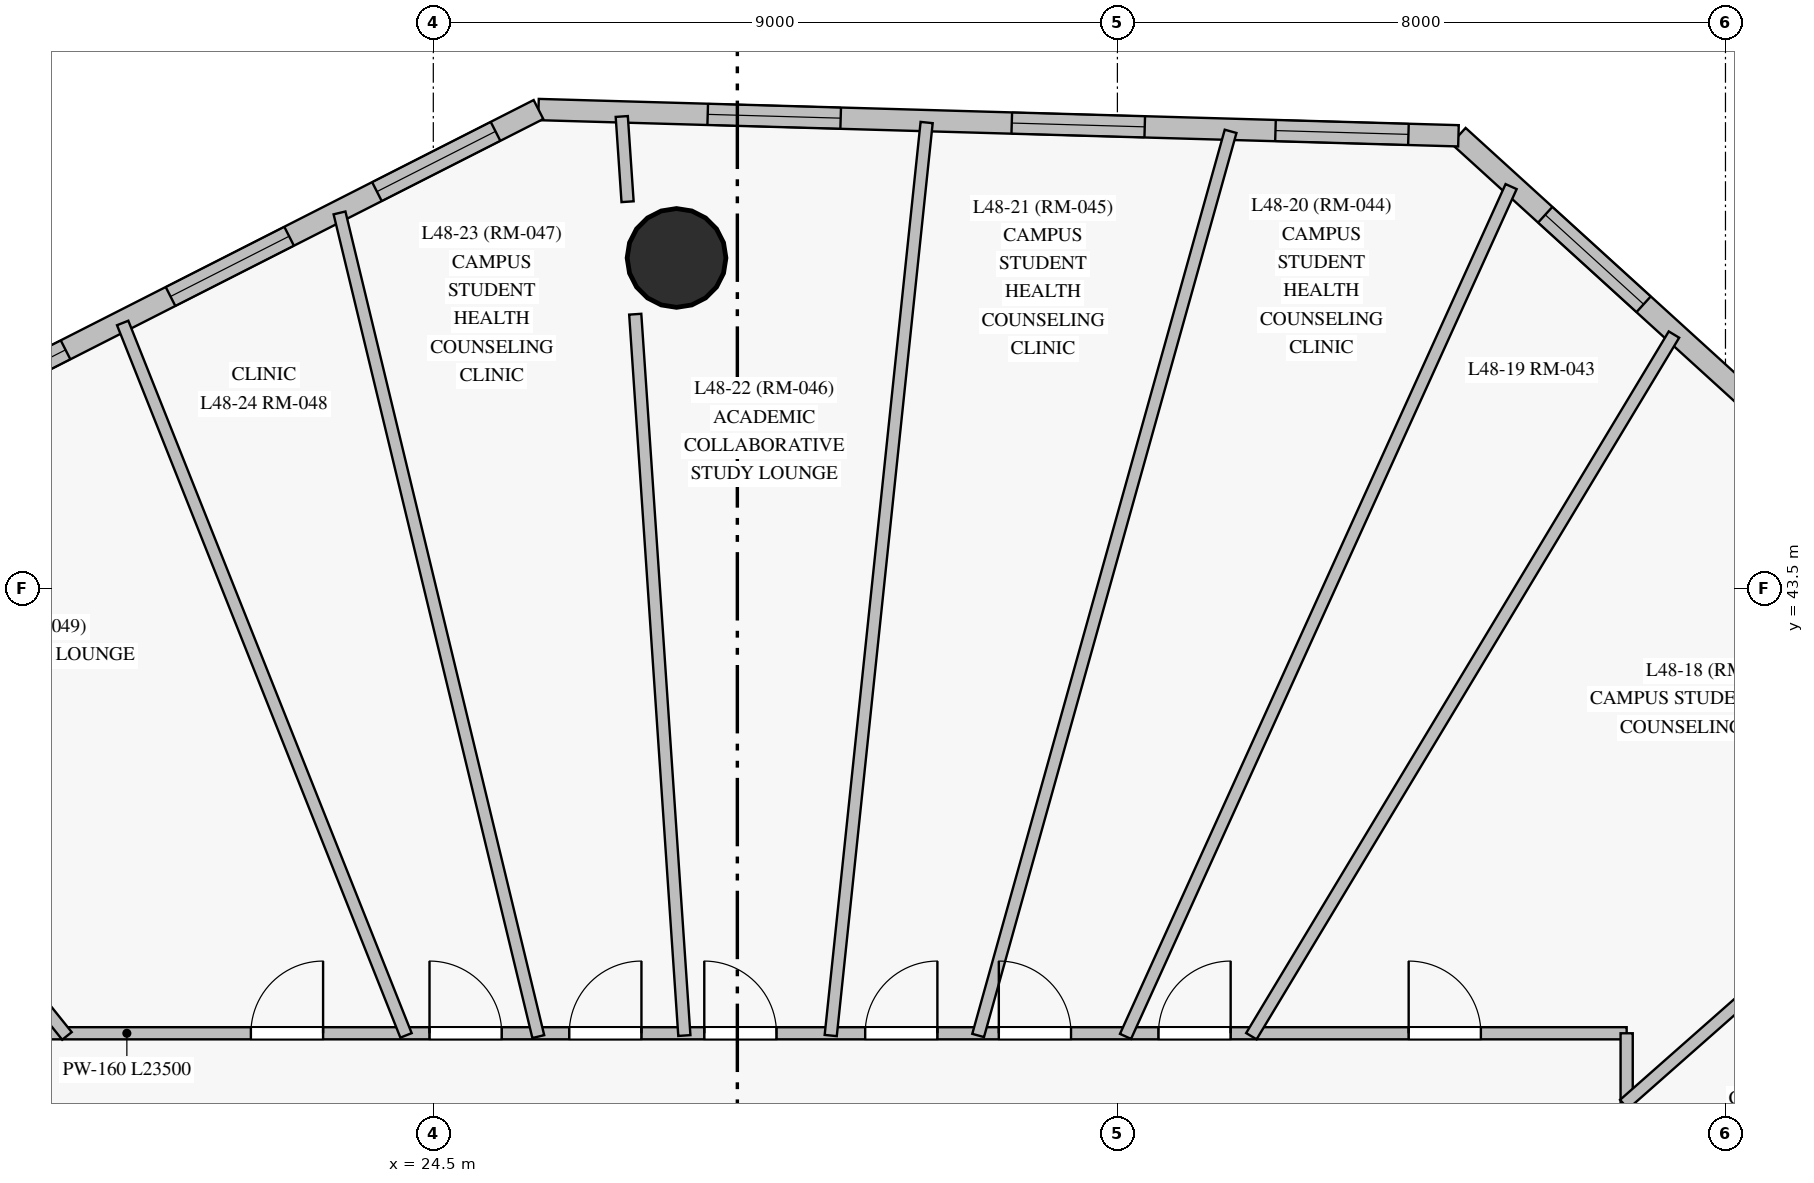
"""IFC4 building model, lengths in metres.
Left out: names, types, materials, properties, quantities, classifications, styles, units other than length and angle.
Written with IfcOpenShell. Run it as: python <this file> out.ifc"""

import sys

from ifc_helpers import new_model, si_unit, direction, frame, frame_2d, origin, origin_with_axes, origin_2d, place, context, subcontext, project, spatial, rectangle, circle, extrude, source, transform, mapped, element, fill, save


model = new_model("IFC4")
c1 = context("Model", 3, precision=1e-05, world=origin(), true_north=direction((0.0, 1.0)))
c2 = subcontext(c1, "Body", "Model", "MODEL_VIEW")
j1 = project(units=[si_unit("LENGTHUNIT", "METRE"), si_unit("PLANEANGLEUNIT", "RADIAN")], contexts=[c1])
p1 = place(None, origin())
s1 = spatial("IfcSite", under=j1, at=p1, CompositionType="ELEMENT")
p2 = place(p1, origin())
s2 = spatial("IfcBuilding", under=s1, at=p2, CompositionType="ELEMENT")
p3 = place(p2, frame((0.0, 0.0, 168.75)))
s3 = spatial("IfcBuildingStorey", under=s2, at=p3, CompositionType="ELEMENT", Elevation=168.75)
m1 = source(origin_with_axes(), c2, "Body", "SweptSolid", [
    extrude(circle(Radius=0.65, at=origin_2d()), origin(), (0.0, 0.0, 1.0), 3.05),
])
p4 = place(p3, frame((27.7, 47.85, 0.0), z_axis=(0.0, 0.0, 1.0), x_axis=(1.0, 0.0, 0.0)))
e1 = element("IfcColumn", 1, at=p4, inside=s3, PredefinedType="COLUMN", context=c2, shape_type="MappedRepresentation", body=[
    mapped(m1, transform((0.0, 0.0, 0.0), scale=1.0)),
])
p5 = place(p3, frame((45.084, 43.0, 0.0), z_axis=(0.0, 0.0, 1.0), x_axis=(-0.739676368258, 0.672962755463, 0.0)))
e2 = element("IfcWall", 2, at=p5, inside=s3, PredefinedType="SOLIDWALL", context=c2, shape_type="SweptSolid", body=[
    extrude(rectangle(XDim=9.595, YDim=0.28, at=frame_2d((4.798, 0.0))), origin(), (0.0, 0.0, 1.0), 2.825),
])
p6 = place(p5, frame((2.021, 0.0, 0.85)))
e3 = element("IfcOpeningElement", 3, at=p6, cuts=e2, PredefinedType="OPENING", context=c2, shape_type="SweptSolid", body=[
    extrude(rectangle(XDim=1.75, YDim=1.65, at=frame_2d((0.875, 0.825))), frame((0.0, 0.15, 0.0), z_axis=(0.0, -1.0, 0.0), x_axis=(1.0, 0.0, 0.0)), (0.0, 0.0, 1.0), 0.3),
])
p7 = place(p5, frame((6.302, 0.0, 0.85)))
e4 = element("IfcOpeningElement", 4, at=p7, cuts=e2, PredefinedType="OPENING", context=c2, shape_type="SweptSolid", body=[
    extrude(rectangle(XDim=1.75, YDim=1.65, at=frame_2d((0.875, 0.825))), frame((0.0, 0.15, 0.0), z_axis=(0.0, -1.0, 0.0), x_axis=(1.0, 0.0, 0.0)), (0.0, 0.0, 1.0), 0.3),
])
p8 = place(p3, frame((37.987, 49.457, 0.0), z_axis=(0.0, 0.0, 1.0), x_axis=(-0.999592924777, 0.028530417713, 0.0)))
e5 = element("IfcWall", 5, at=p8, inside=s3, PredefinedType="SOLIDWALL", context=c2, shape_type="SweptSolid", body=[
    extrude(rectangle(XDim=12.108, YDim=0.28, at=frame_2d((6.054, 0.0))), origin(), (0.0, 0.0, 1.0), 2.825),
])
p9 = place(p8, frame((0.658, 0.0, 0.85)))
e6 = element("IfcOpeningElement", 6, at=p9, cuts=e5, PredefinedType="OPENING", context=c2, shape_type="SweptSolid", body=[
    extrude(rectangle(XDim=1.75, YDim=1.65, at=frame_2d((0.875, 0.825))), frame((0.0, 0.15, 0.0), z_axis=(0.0, -1.0, 0.0), x_axis=(1.0, 0.0, 0.0)), (0.0, 0.0, 1.0), 0.3),
])
p10 = place(p8, frame((4.129, 0.0, 0.85)))
e7 = element("IfcOpeningElement", 7, at=p10, cuts=e5, PredefinedType="OPENING", context=c2, shape_type="SweptSolid", body=[
    extrude(rectangle(XDim=1.75, YDim=1.65, at=frame_2d((0.875, 0.825))), frame((0.0, 0.15, 0.0), z_axis=(0.0, -1.0, 0.0), x_axis=(1.0, 0.0, 0.0)), (0.0, 0.0, 1.0), 0.3),
])
p11 = place(p8, frame((8.131, 0.0, 0.85)))
e8 = element("IfcOpeningElement", 8, at=p11, cuts=e5, PredefinedType="OPENING", context=c2, shape_type="SweptSolid", body=[
    extrude(rectangle(XDim=1.75, YDim=1.65, at=frame_2d((0.875, 0.825))), frame((0.0, 0.15, 0.0), z_axis=(0.0, -1.0, 0.0), x_axis=(1.0, 0.0, 0.0)), (0.0, 0.0, 1.0), 0.3),
])
p12 = place(p3, frame((25.884, 49.802, 0.0), z_axis=(0.0, 0.0, 1.0), x_axis=(-0.89150888701, -0.453003205708, 0.0)))
e9 = element("IfcWall", 9, at=p12, inside=s3, PredefinedType="SOLIDWALL", context=c2, shape_type="SweptSolid", body=[
    extrude(rectangle(XDim=9.616, YDim=0.28, at=frame_2d((4.808, 0.0))), origin(), (0.0, 0.0, 1.0), 2.825),
])
p13 = place(p12, frame((0.634, 0.0, 0.85)))
e10 = element("IfcOpeningElement", 10, at=p13, cuts=e9, PredefinedType="OPENING", context=c2, shape_type="SweptSolid", body=[
    extrude(rectangle(XDim=1.75, YDim=1.65, at=frame_2d((0.875, 0.825))), frame((0.0, 0.15, 0.0), z_axis=(0.0, -1.0, 0.0), x_axis=(1.0, 0.0, 0.0)), (0.0, 0.0, 1.0), 0.3),
])
p14 = place(p12, frame((3.68, 0.0, 0.85)))
e11 = element("IfcOpeningElement", 11, at=p14, cuts=e9, PredefinedType="OPENING", context=c2, shape_type="SweptSolid", body=[
    extrude(rectangle(XDim=1.75, YDim=1.65, at=frame_2d((0.875, 0.825))), frame((0.0, 0.15, 0.0), z_axis=(0.0, -1.0, 0.0), x_axis=(1.0, 0.0, 0.0)), (0.0, 0.0, 1.0), 0.3),
])
p15 = place(p12, frame((6.979, 0.0, 0.85)))
e12 = element("IfcOpeningElement", 12, at=p15, cuts=e9, PredefinedType="OPENING", context=c2, shape_type="SweptSolid", body=[
    extrude(rectangle(XDim=1.75, YDim=1.65, at=frame_2d((0.875, 0.825))), frame((0.0, 0.15, 0.0), z_axis=(0.0, -1.0, 0.0), x_axis=(1.0, 0.0, 0.0)), (0.0, 0.0, 1.0), 0.3),
])
p16 = place(p3, frame((16.7, 37.65, 0.0), z_axis=(0.0, 0.0, 1.0), x_axis=(1.0, 0.0, 0.0)))
e13 = element("IfcWall", 13, at=p16, inside=s3, PredefinedType="PARTITIONING", context=c2, shape_type="SweptSolid", body=[
    extrude(rectangle(XDim=23.5, YDim=0.16, at=frame_2d((11.75, 0.0))), origin(), (0.0, 0.0, 1.0), 2.375),
])
p17 = place(p16, frame((20.632, 0.0, 0.0)))
e14 = element("IfcOpeningElement", 14, at=p17, cuts=e13, PredefinedType="OPENING", context=c2, shape_type="SweptSolid", body=[
    extrude(rectangle(XDim=0.95, YDim=2.15, at=frame_2d((0.475, 1.075))), frame((0.0, 0.09, 0.0), z_axis=(0.0, -1.0, 0.0), x_axis=(1.0, 0.0, 0.0)), (0.0, 0.0, 1.0), 0.18),
])
p18 = place(p16, frame((17.34, 0.0, 0.0)))
e15 = element("IfcOpeningElement", 15, at=p18, cuts=e13, PredefinedType="OPENING", context=c2, shape_type="SweptSolid", body=[
    extrude(rectangle(XDim=0.95, YDim=2.15, at=frame_2d((0.475, 1.075))), frame((0.0, 0.09, 0.0), z_axis=(0.0, -1.0, 0.0), x_axis=(1.0, 0.0, 0.0)), (0.0, 0.0, 1.0), 0.18),
])
p19 = place(p16, frame((15.24, 0.0, 0.0)))
e16 = element("IfcOpeningElement", 16, at=p19, cuts=e13, PredefinedType="OPENING", context=c2, shape_type="SweptSolid", body=[
    extrude(rectangle(XDim=0.95, YDim=2.15, at=frame_2d((0.475, 1.075))), frame((0.0, 0.09, 0.0), z_axis=(0.0, -1.0, 0.0), x_axis=(1.0, 0.0, 0.0)), (0.0, 0.0, 1.0), 0.18),
])
p20 = place(p16, frame((13.482, 0.0, 0.0)))
e17 = element("IfcOpeningElement", 17, at=p20, cuts=e13, PredefinedType="OPENING", context=c2, shape_type="SweptSolid", body=[
    extrude(rectangle(XDim=0.95, YDim=2.15, at=frame_2d((0.475, 1.075))), frame((0.0, 0.09, 0.0), z_axis=(0.0, -1.0, 0.0), x_axis=(1.0, 0.0, 0.0)), (0.0, 0.0, 1.0), 0.18),
])
p21 = place(p16, frame((11.365, 0.0, 0.0)))
e18 = element("IfcOpeningElement", 18, at=p21, cuts=e13, PredefinedType="OPENING", context=c2, shape_type="SweptSolid", body=[
    extrude(rectangle(XDim=0.95, YDim=2.15, at=frame_2d((0.475, 1.075))), frame((0.0, 0.09, 0.0), z_axis=(0.0, -1.0, 0.0), x_axis=(1.0, 0.0, 0.0)), (0.0, 0.0, 1.0), 0.18),
])
p22 = place(p16, frame((9.588, 0.0, 0.0)))
e19 = element("IfcOpeningElement", 19, at=p22, cuts=e13, PredefinedType="OPENING", context=c2, shape_type="SweptSolid", body=[
    extrude(rectangle(XDim=0.95, YDim=2.15, at=frame_2d((0.475, 1.075))), frame((0.0, 0.09, 0.0), z_axis=(0.0, -1.0, 0.0), x_axis=(1.0, 0.0, 0.0)), (0.0, 0.0, 1.0), 0.18),
])
p23 = place(p16, frame((7.75, 0.0, 0.0)))
e20 = element("IfcOpeningElement", 20, at=p23, cuts=e13, PredefinedType="OPENING", context=c2, shape_type="SweptSolid", body=[
    extrude(rectangle(XDim=0.95, YDim=2.15, at=frame_2d((0.475, 1.075))), frame((0.0, 0.09, 0.0), z_axis=(0.0, -1.0, 0.0), x_axis=(1.0, 0.0, 0.0)), (0.0, 0.0, 1.0), 0.18),
])
p24 = place(p16, frame((5.4, 0.0, 0.0)))
e21 = element("IfcOpeningElement", 21, at=p24, cuts=e13, PredefinedType="OPENING", context=c2, shape_type="SweptSolid", body=[
    extrude(rectangle(XDim=0.95, YDim=2.15, at=frame_2d((0.475, 1.075))), frame((0.0, 0.09, 0.0), z_axis=(0.0, -1.0, 0.0), x_axis=(1.0, 0.0, 0.0)), (0.0, 0.0, 1.0), 0.18),
])
p25 = place(p16, frame((1.277, 0.0, 0.0)))
e22 = element("IfcOpeningElement", 22, at=p25, cuts=e13, PredefinedType="OPENING", context=c2, shape_type="SweptSolid", body=[
    extrude(rectangle(XDim=0.86, YDim=2.04, at=frame_2d((0.43, 1.02))), frame((0.0, 0.09, 0.0), z_axis=(0.0, -1.0, 0.0), x_axis=(1.0, 0.0, 0.0)), (0.0, 0.0, 1.0), 0.18),
])
p26 = place(p3, frame((40.2, 37.65, 0.0), z_axis=(0.0, 0.0, 1.0), x_axis=(0.0, -1.0, 0.0)))
e23 = element("IfcWall", 23, at=p26, inside=s3, PredefinedType="PARTITIONING", context=c2, shape_type="SweptSolid", body=[
    extrude(rectangle(XDim=22.3, YDim=0.16, at=frame_2d((11.15, 0.0))), origin(), (0.0, 0.0, 1.0), 2.375),
])
p27 = place(p26, frame((14.02, 0.0, 0.0)))
e24 = element("IfcOpeningElement", 24, at=p27, cuts=e23, PredefinedType="OPENING", context=c2, shape_type="SweptSolid", body=[
    extrude(rectangle(XDim=0.95, YDim=2.15, at=frame_2d((0.475, 1.075))), frame((0.0, 0.09, 0.0), z_axis=(0.0, -1.0, 0.0), x_axis=(1.0, 0.0, 0.0)), (0.0, 0.0, 1.0), 0.18),
])
p28 = place(p26, frame((10.675, 0.0, 0.0)))
e25 = element("IfcOpeningElement", 25, at=p28, cuts=e23, PredefinedType="OPENING", context=c2, shape_type="SweptSolid", body=[
    extrude(rectangle(XDim=0.95, YDim=2.15, at=frame_2d((0.475, 1.075))), frame((0.0, 0.09, 0.0), z_axis=(0.0, -1.0, 0.0), x_axis=(1.0, 0.0, 0.0)), (0.0, 0.0, 1.0), 0.18),
])
p29 = place(p26, frame((7.33, 0.0, 0.0)))
e26 = element("IfcOpeningElement", 26, at=p29, cuts=e23, PredefinedType="OPENING", context=c2, shape_type="SweptSolid", body=[
    extrude(rectangle(XDim=0.95, YDim=2.15, at=frame_2d((0.475, 1.075))), frame((0.0, 0.09, 0.0), z_axis=(0.0, -1.0, 0.0), x_axis=(1.0, 0.0, 0.0)), (0.0, 0.0, 1.0), 0.18),
])
p30 = place(p26, frame((2.181, 0.0, 0.0)))
e27 = element("IfcOpeningElement", 27, at=p30, cuts=e23, PredefinedType="OPENING", context=c2, shape_type="SweptSolid", body=[
    extrude(rectangle(XDim=0.95, YDim=2.15, at=frame_2d((0.475, 1.075))), frame((0.0, 0.09, 0.0), z_axis=(0.0, -1.0, 0.0), x_axis=(1.0, 0.0, 0.0)), (0.0, 0.0, 1.0), 0.18),
])
p31 = place(p3, frame((31.668, 37.621, 0.0), z_axis=(0.0, 0.0, 1.0), x_axis=(0.268958912478, 0.963151651298, 0.0)))
e28 = element("IfcWall", 28, at=p31, inside=s3, PredefinedType="PARTITIONING", context=c2, shape_type="SweptSolid", body=[
    extrude(rectangle(XDim=12.35, YDim=0.16, at=frame_2d((6.175, 0.0))), origin(), (0.0, 0.0, 1.0), 2.825),
])
p32 = place(p3, frame((33.607, 37.609, 0.0), z_axis=(0.0, 0.0, 1.0), x_axis=(0.413209547716, 0.9106359699, 0.0)))
e29 = element("IfcWall", 29, at=p32, inside=s3, PredefinedType="PARTITIONING", context=c2, shape_type="SweptSolid", body=[
    extrude(rectangle(XDim=12.277, YDim=0.16, at=frame_2d((6.139, 0.0))), origin(), (0.0, 0.0, 1.0), 2.825),
])
p33 = place(p3, frame((29.729, 37.62, 0.0), z_axis=(0.0, 0.0, 1.0), x_axis=(0.104488010934, 0.994526146248, 0.0)))
e30 = element("IfcWall", 30, at=p33, inside=s3, PredefinedType="PARTITIONING", context=c2, shape_type="SweptSolid", body=[
    extrude(rectangle(XDim=12.078, YDim=0.16, at=frame_2d((6.039, 0.0))), origin(), (0.0, 0.0, 1.0), 2.825),
])
p34 = place(p3, frame((25.881, 37.606, 0.0), z_axis=(0.0, 0.0, 1.0), x_axis=(-0.234601997251, 0.972091509522, 0.0)))
e31 = element("IfcWall", 31, at=p34, inside=s3, PredefinedType="PARTITIONING", context=c2, shape_type="SweptSolid", body=[
    extrude(rectangle(XDim=11.147, YDim=0.16, at=frame_2d((5.574, 0.0))), origin(), (0.0, 0.0, 1.0), 2.825),
])
p35 = place(p3, frame((35.263, 37.612, 0.0), z_axis=(0.0, 0.0, 1.0), x_axis=(0.515947737753, 0.856620062751, 0.0)))
e32 = element("IfcWall", 32, at=p35, inside=s3, PredefinedType="PARTITIONING", context=c2, shape_type="SweptSolid", body=[
    extrude(rectangle(XDim=10.775, YDim=0.16, at=frame_2d((5.388, 0.0))), origin(), (0.0, 0.0, 1.0), 2.825),
])
p36 = place(p3, frame((24.141, 37.622, 0.0), z_axis=(0.0, 0.0, 1.0), x_axis=(-0.369574647979, 0.929201043677, 0.0)))
e33 = element("IfcWall", 33, at=p36, inside=s3, PredefinedType="PARTITIONING", context=c2, shape_type="SweptSolid", body=[
    extrude(rectangle(XDim=10.087, YDim=0.16, at=frame_2d((5.043, 0.0))), origin(), (0.0, 0.0, 1.0), 2.825),
])
p37 = place(p3, frame((27.803, 37.62, 0.0), z_axis=(0.0, 0.0, 1.0), x_axis=(-0.067965244052, 0.99768768941, 0.0)))
e34 = element("IfcWall", 34, at=p37, inside=s3, PredefinedType="PARTITIONING", context=c2, shape_type="SweptSolid", body=[
    extrude(rectangle(XDim=9.512, YDim=0.16, at=frame_2d((4.756, 0.0))), origin(), (0.0, 0.0, 1.0), 2.275),
])
p38 = place(p3, frame((19.68, 37.615, 0.0), z_axis=(0.0, 0.0, 1.0), x_axis=(-0.624925342078, 0.780684518118, 0.0)))
e35 = element("IfcWall", 35, at=p38, inside=s3, PredefinedType="PARTITIONING", context=c2, shape_type="SweptSolid", body=[
    extrude(rectangle(XDim=6.851, YDim=0.16, at=frame_2d((3.426, 0.0))), origin(), (0.0, 0.0, 1.0), 2.825),
])
p39 = place(p3, frame((40.166, 36.714, 0.0), z_axis=(0.0, 0.0, 1.0), x_axis=(0.749832283788, 0.661627951487, 0.0)))
e36 = element("IfcWall", 36, at=p39, inside=s3, PredefinedType="PARTITIONING", context=c2, shape_type="SweptSolid", body=[
    extrude(rectangle(XDim=2.558, YDim=0.16, at=frame_2d((1.279, 0.0))), origin(), (0.0, 0.0, 1.0), 2.275),
])
p40 = place(p3, frame((27.056, 48.59, 0.0), z_axis=(0.0, 0.0, 1.0), x_axis=(-0.068004228073, 0.997685032946, 0.0)))
e37 = element("IfcWall", 37, at=p40, inside=s3, PredefinedType="PARTITIONING", context=c2, shape_type="SweptSolid", body=[
    extrude(rectangle(XDim=1.124, YDim=0.16, at=frame_2d((0.562, 0.0))), origin(), (0.0, 0.0, 1.0), 2.825),
])
m2 = source(origin_with_axes(), c2, "Body", "SweptSolid", [
    extrude(rectangle(XDim=1.75, YDim=1.65, at=frame_2d((0.875, 0.825))), frame((0.0, 0.03, 0.0), z_axis=(0.0, -1.0, 0.0), x_axis=(1.0, 0.0, 0.0)), (0.0, 0.0, 1.0), 0.06),
])
p41 = place(p7, origin())
e38 = element("IfcWindow", 38, at=p41, inside=s3, PartitioningType="SINGLE_PANEL", PredefinedType="WINDOW", context=c2, shape_type="MappedRepresentation", body=[
    mapped(m2, transform((0.0, 0.0, 0.0), scale=1.0)),
])
fill(e4, e38)
p42 = place(p9, origin())
e39 = element("IfcWindow", 39, at=p42, inside=s3, PartitioningType="SINGLE_PANEL", PredefinedType="WINDOW", context=c2, shape_type="MappedRepresentation", body=[
    mapped(m2, transform((0.0, 0.0, 0.0), scale=1.0)),
])
fill(e6, e39)
p43 = place(p10, origin())
e40 = element("IfcWindow", 40, at=p43, inside=s3, PartitioningType="SINGLE_PANEL", PredefinedType="WINDOW", context=c2, shape_type="MappedRepresentation", body=[
    mapped(m2, transform((0.0, 0.0, 0.0), scale=1.0)),
])
fill(e7, e40)
p44 = place(p11, origin())
e41 = element("IfcWindow", 41, at=p44, inside=s3, PartitioningType="SINGLE_PANEL", PredefinedType="WINDOW", context=c2, shape_type="MappedRepresentation", body=[
    mapped(m2, transform((0.0, 0.0, 0.0), scale=1.0)),
])
fill(e8, e41)
p45 = place(p13, origin())
e42 = element("IfcWindow", 42, at=p45, inside=s3, PartitioningType="SINGLE_PANEL", PredefinedType="WINDOW", context=c2, shape_type="MappedRepresentation", body=[
    mapped(m2, transform((0.0, 0.0, 0.0), scale=1.0)),
])
fill(e10, e42)
p46 = place(p14, origin())
e43 = element("IfcWindow", 43, at=p46, inside=s3, PartitioningType="SINGLE_PANEL", PredefinedType="WINDOW", context=c2, shape_type="MappedRepresentation", body=[
    mapped(m2, transform((0.0, 0.0, 0.0), scale=1.0)),
])
fill(e11, e43)
p47 = place(p15, origin())
e44 = element("IfcWindow", 44, at=p47, inside=s3, PartitioningType="SINGLE_PANEL", PredefinedType="WINDOW", context=c2, shape_type="MappedRepresentation", body=[
    mapped(m2, transform((0.0, 0.0, 0.0), scale=1.0)),
])
fill(e12, e44)
m3 = source(origin_with_axes(), c2, "Body", "SweptSolid", [
    extrude(rectangle(XDim=0.95, YDim=2.15, at=frame_2d((0.475, 1.075))), frame((0.0, 0.025, 0.0), z_axis=(0.0, -1.0, 0.0), x_axis=(1.0, 0.0, 0.0)), (0.0, 0.0, 1.0), 0.05),
])
p48 = place(p17, origin())
e45 = element("IfcDoor", 45, at=p48, inside=s3, OperationType="SINGLE_SWING_LEFT", PredefinedType="DOOR", context=c2, shape_type="MappedRepresentation", body=[
    mapped(m3, transform((0.0, 0.0, 0.0), scale=1.0)),
])
fill(e14, e45)
p49 = place(p18, origin())
e46 = element("IfcDoor", 46, at=p49, inside=s3, OperationType="SINGLE_SWING_RIGHT", PredefinedType="DOOR", context=c2, shape_type="MappedRepresentation", body=[
    mapped(m3, transform((0.0, 0.0, 0.0), scale=1.0)),
])
fill(e15, e46)
p50 = place(p19, origin())
e47 = element("IfcDoor", 47, at=p50, inside=s3, OperationType="SINGLE_SWING_LEFT", PredefinedType="DOOR", context=c2, shape_type="MappedRepresentation", body=[
    mapped(m3, transform((0.0, 0.0, 0.0), scale=1.0)),
])
fill(e16, e47)
p51 = place(p20, origin())
e48 = element("IfcDoor", 48, at=p51, inside=s3, OperationType="SINGLE_SWING_RIGHT", PredefinedType="DOOR", context=c2, shape_type="MappedRepresentation", body=[
    mapped(m3, transform((0.0, 0.0, 0.0), scale=1.0)),
])
fill(e17, e48)
p52 = place(p21, origin())
e49 = element("IfcDoor", 49, at=p52, inside=s3, OperationType="SINGLE_SWING_LEFT", PredefinedType="DOOR", context=c2, shape_type="MappedRepresentation", body=[
    mapped(m3, transform((0.0, 0.0, 0.0), scale=1.0)),
])
fill(e18, e49)
p53 = place(p22, origin())
e50 = element("IfcDoor", 50, at=p53, inside=s3, OperationType="SINGLE_SWING_RIGHT", PredefinedType="DOOR", context=c2, shape_type="MappedRepresentation", body=[
    mapped(m3, transform((0.0, 0.0, 0.0), scale=1.0)),
])
fill(e19, e50)
p54 = place(p23, origin())
e51 = element("IfcDoor", 51, at=p54, inside=s3, OperationType="SINGLE_SWING_LEFT", PredefinedType="DOOR", context=c2, shape_type="MappedRepresentation", body=[
    mapped(m3, transform((0.0, 0.0, 0.0), scale=1.0)),
])
fill(e20, e51)
p55 = place(p24, origin())
e52 = element("IfcDoor", 52, at=p55, inside=s3, OperationType="SINGLE_SWING_RIGHT", PredefinedType="DOOR", context=c2, shape_type="MappedRepresentation", body=[
    mapped(m3, transform((0.0, 0.0, 0.0), scale=1.0)),
])
fill(e21, e52)
save(model, sys.argv[1])
